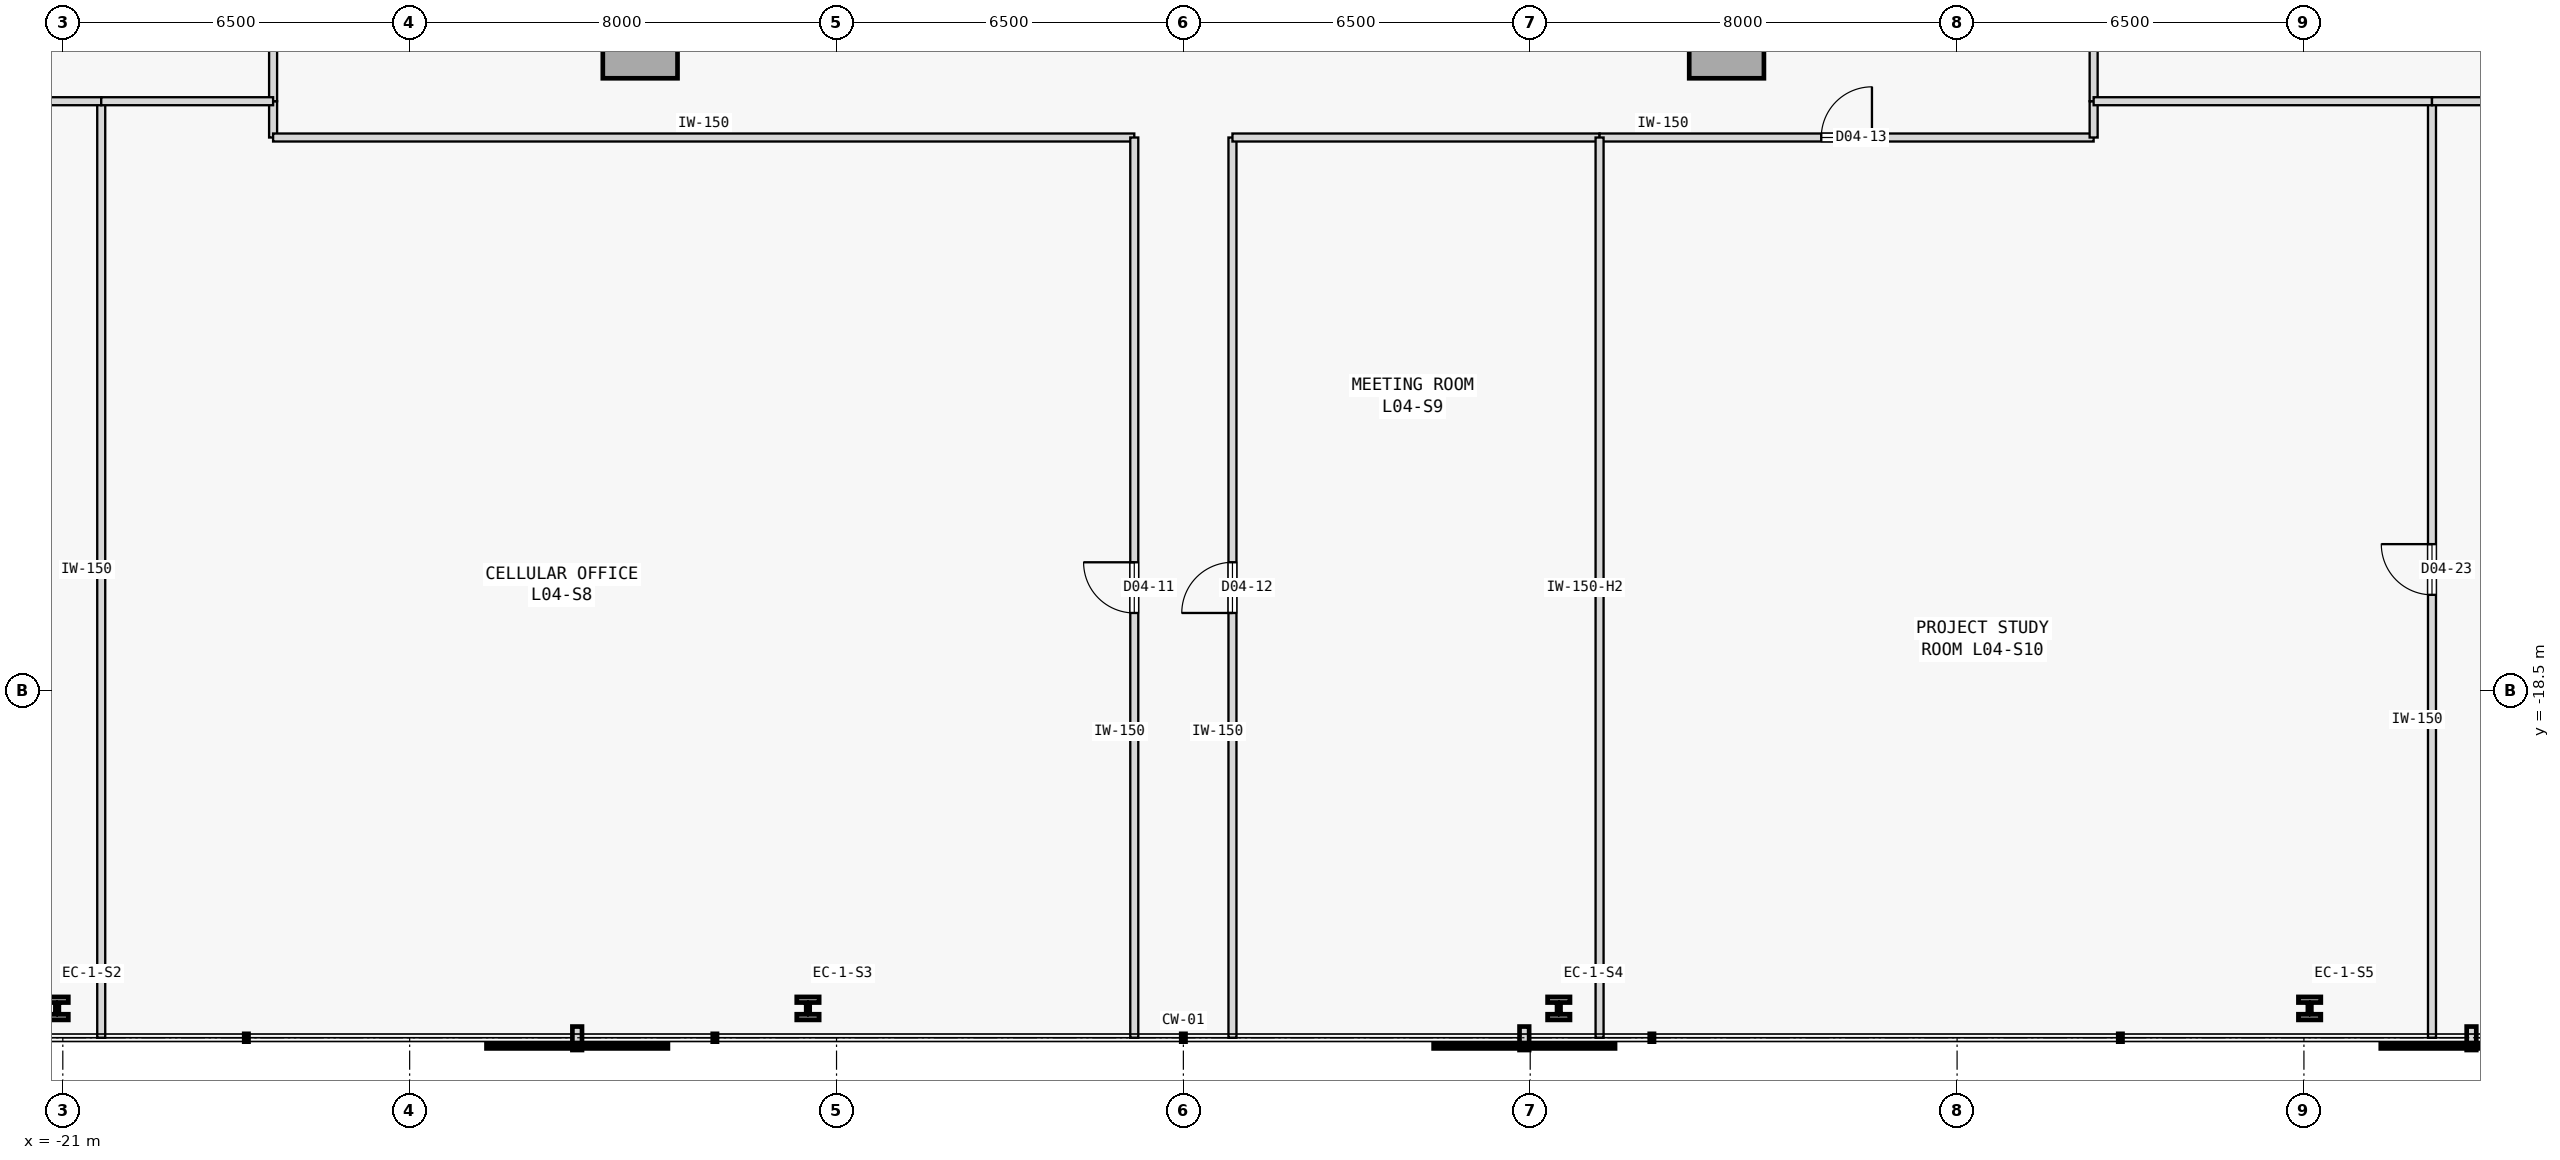
"""IFC4 building model, lengths in metres.
Left out: names, types, materials, properties, quantities, classifications, styles, units other than length and angle.
Written with IfcOpenShell. Run it as: python <this file> out.ifc"""

import sys

from ifc_helpers import new_model, si_unit, direction, frame, frame_2d, origin, origin_2d, place, context, subcontext, project, spatial, rectangle, i_section, extrude, element, fill, save


model = new_model("IFC4")
c1 = context("Model", 3, precision=1e-05, world=origin(), true_north=direction((0.0, 1.0)))
c2 = subcontext(c1, "Body", "Model", "MODEL_VIEW")
j1 = project(units=[si_unit("LENGTHUNIT", "METRE"), si_unit("PLANEANGLEUNIT", "RADIAN")], contexts=[c1])
p1 = place(None, origin())
s1 = spatial("IfcSite", under=j1, at=p1, CompositionType="ELEMENT")
p2 = place(p1, origin())
s2 = spatial("IfcBuilding", under=s1, at=p2, CompositionType="ELEMENT")
p3 = place(p2, frame((0.0, 0.0, 21.8)))
s3 = spatial("IfcBuildingStorey", under=s2, at=p3, CompositionType="ELEMENT", Elevation=21.8)
for number, where, z_axis, x_axis in (
    (1, (-10.18, -6.32, 0.0), (0.0, 0.0, 1.0), (1.0, 0.0, 0.0)),
    (2, (10.18, -6.32, 0.0), (0.0, 0.0, 1.0), (1.0, 0.0, 0.0)),
):
    element("IfcColumn", number, at=place(p3, frame(where, z_axis=z_axis, x_axis=x_axis)), inside=s3, PredefinedType="COLUMN", context=c2, shape_type="SweptSolid", body=[
        extrude(rectangle(XDim=1.4, YDim=1.4, at=origin_2d()), origin(), (0.0, 0.0, 1.0), 3.8),
    ])
for number, where, z_axis, x_axis in (
    (3, (-21.107, -24.45, 0.0), (0.0, 0.0, 1.0), (1.0, 0.0, 0.0)),
    (4, (-7.036, -24.45, 0.0), (0.0, 0.0, 1.0), (1.0, 0.0, 0.0)),
    (5, (7.036, -24.45, 0.0), (0.0, 0.0, 1.0), (1.0, 0.0, 0.0)),
    (6, (21.107, -24.45, 0.0), (0.0, 0.0, 1.0), (1.0, 0.0, 0.0)),
):
    element("IfcColumn", number, at=place(p3, frame(where, z_axis=z_axis, x_axis=x_axis)), inside=s3, PredefinedType="COLUMN", context=c2, shape_type="SweptSolid", body=[
        extrude(i_section(OverallWidth=0.42, OverallDepth=0.431, WebThickness=0.065, FlangeThickness=0.106, FilletRadius=0.015, at=origin_2d()), origin(), (0.0, 0.0, 1.0), 3.8),
    ])
p4 = place(p3, frame((-17.059, -8.13, 0.0), z_axis=(0.0, 0.0, 1.0), x_axis=(0.0, 1.0, 0.0)))
e7 = element("IfcWall", 7, at=p4, inside=s3, PredefinedType="PARTITIONING", context=c2, shape_type="SweptSolid", body=[
    extrude(rectangle(XDim=0.68, YDim=0.15, at=frame_2d((0.34, 0.0))), origin(), (0.0, 0.0, 1.0), 3.575),
])
p5 = place(p3, frame((-17.059, -8.13, 0.0), z_axis=(0.0, 0.0, 1.0), x_axis=(1.0, 0.0, 0.0)))
e8 = element("IfcWall", 8, at=p5, inside=s3, PredefinedType="PARTITIONING", context=c2, shape_type="SweptSolid", body=[
    extrude(rectangle(XDim=16.139, YDim=0.15, at=frame_2d((8.07, 0.0))), origin(), (0.0, 0.0, 1.0), 3.575),
])
p6 = place(p3, frame((-0.92, -25.0, 0.0), z_axis=(0.0, 0.0, 1.0), x_axis=(0.0, 1.0, 0.0)))
e9 = element("IfcWall", 9, at=p6, inside=s3, PredefinedType="PARTITIONING", context=c2, shape_type="SweptSolid", body=[
    extrude(rectangle(XDim=16.87, YDim=0.15, at=frame_2d((8.435, 0.0))), origin(), (0.0, 0.0, 1.0), 3.575),
])
p7 = place(p6, frame((7.96, 0.0, 0.0)))
e10 = element("IfcOpeningElement", 10, at=p7, cuts=e9, PredefinedType="OPENING", context=c2, shape_type="SweptSolid", body=[
    extrude(rectangle(XDim=0.95, YDim=2.15, at=frame_2d((0.475, 1.075))), frame((0.0, 0.085, 0.0), z_axis=(0.0, -1.0, 0.0), x_axis=(1.0, 0.0, 0.0)), (0.0, 0.0, 1.0), 0.17),
])
p8 = place(p3, frame((0.92, -25.0, 0.0), z_axis=(0.0, 0.0, 1.0), x_axis=(0.0, 1.0, 0.0)))
e11 = element("IfcWall", 11, at=p8, inside=s3, PredefinedType="PARTITIONING", context=c2, shape_type="SweptSolid", body=[
    extrude(rectangle(XDim=16.87, YDim=0.15, at=frame_2d((8.435, 0.0))), origin(), (0.0, 0.0, 1.0), 3.575),
])
p9 = place(p8, frame((7.96, 0.0, 0.0)))
e12 = element("IfcOpeningElement", 12, at=p9, cuts=e11, PredefinedType="OPENING", context=c2, shape_type="SweptSolid", body=[
    extrude(rectangle(XDim=0.95, YDim=2.15, at=frame_2d((0.475, 1.075))), frame((0.0, 0.085, 0.0), z_axis=(0.0, -1.0, 0.0), x_axis=(1.0, 0.0, 0.0)), (0.0, 0.0, 1.0), 0.17),
])
p10 = place(p3, frame((0.92, -8.13, 0.0), z_axis=(0.0, 0.0, 1.0), x_axis=(1.0, 0.0, 0.0)))
e13 = element("IfcWall", 13, at=p10, inside=s3, PredefinedType="PARTITIONING", context=c2, shape_type="SweptSolid", body=[
    extrude(rectangle(XDim=6.88, YDim=0.15, at=frame_2d((3.44, 0.0))), origin(), (0.0, 0.0, 1.0), 3.575),
])
p11 = place(p3, frame((7.8, -8.13, 0.0), z_axis=(0.0, 0.0, 1.0), x_axis=(1.0, 0.0, 0.0)))
e14 = element("IfcWall", 14, at=p11, inside=s3, PredefinedType="PARTITIONING", context=c2, shape_type="SweptSolid", body=[
    extrude(rectangle(XDim=9.259, YDim=0.15, at=frame_2d((4.629, 0.0))), origin(), (0.0, 0.0, 1.0), 3.575),
])
p12 = place(p11, frame((4.155, 0.0, 0.0)))
e15 = element("IfcOpeningElement", 15, at=p12, cuts=e14, PredefinedType="OPENING", context=c2, shape_type="SweptSolid", body=[
    extrude(rectangle(XDim=0.95, YDim=2.15, at=frame_2d((0.475, 1.075))), frame((0.0, 0.085, 0.0), z_axis=(0.0, -1.0, 0.0), x_axis=(1.0, 0.0, 0.0)), (0.0, 0.0, 1.0), 0.17),
])
p13 = place(p3, frame((17.059, -8.13, 0.0), z_axis=(0.0, 0.0, 1.0), x_axis=(0.0, 1.0, 0.0)))
e16 = element("IfcWall", 16, at=p13, inside=s3, PredefinedType="PARTITIONING", context=c2, shape_type="SweptSolid", body=[
    extrude(rectangle(XDim=0.68, YDim=0.15, at=frame_2d((0.34, 0.0))), origin(), (0.0, 0.0, 1.0), 3.575),
])
p14 = place(p3, frame((-17.059, -7.45, 0.0), z_axis=(0.0, 0.0, 1.0), x_axis=(0.0, 1.0, 0.0)))
e17 = element("IfcWall", 17, at=p14, inside=s3, PredefinedType="PARTITIONING", context=c2, shape_type="SweptSolid", body=[
    extrude(rectangle(XDim=3.129, YDim=0.15, at=frame_2d((1.564, 0.0))), origin(), (0.0, 0.0, 1.0), 3.575),
])
p15 = place(p14, frame((1.09, 0.0, 0.0)))
e18 = element("IfcOpeningElement", 18, at=p15, cuts=e17, PredefinedType="OPENING", context=c2, shape_type="SweptSolid", body=[
    extrude(rectangle(XDim=0.95, YDim=2.15, at=frame_2d((0.475, 1.075))), frame((0.0, 0.085, 0.0), z_axis=(0.0, -1.0, 0.0), x_axis=(1.0, 0.0, 0.0)), (0.0, 0.0, 1.0), 0.17),
])
p16 = place(p3, frame((17.059, -7.45, 0.0), z_axis=(0.0, 0.0, 1.0), x_axis=(0.0, 1.0, 0.0)))
e19 = element("IfcWall", 19, at=p16, inside=s3, PredefinedType="PARTITIONING", context=c2, shape_type="SweptSolid", body=[
    extrude(rectangle(XDim=6.53, YDim=0.15, at=frame_2d((3.265, 0.0))), origin(), (0.0, 0.0, 1.0), 3.575),
])
p17 = place(p3, frame((-20.28, -25.0, 0.0), z_axis=(0.0, 0.0, 1.0), x_axis=(0.0, 1.0, 0.0)))
e20 = element("IfcWall", 20, at=p17, inside=s3, PredefinedType="PARTITIONING", context=c2, shape_type="SweptSolid", body=[
    extrude(rectangle(XDim=17.55, YDim=0.15, at=frame_2d((8.775, 0.0))), origin(), (0.0, 0.0, 1.0), 3.575),
])
p18 = place(p3, frame((-39.0, -7.45, 0.0), z_axis=(0.0, 0.0, 1.0), x_axis=(1.0, 0.0, 0.0)))
e21 = element("IfcWall", 21, at=p18, inside=s3, PredefinedType="PARTITIONING", context=c2, shape_type="SweptSolid", body=[
    extrude(rectangle(XDim=18.72, YDim=0.15, at=frame_2d((9.36, 0.0))), origin(), (0.0, 0.0, 1.0), 3.575),
])
p19 = place(p18, frame((8.885, 0.0, 0.0)))
e22 = element("IfcOpeningElement", 22, at=p19, cuts=e21, PredefinedType="OPENING", context=c2, shape_type="SweptSolid", body=[
    extrude(rectangle(XDim=0.95, YDim=2.15, at=frame_2d((0.475, 1.075))), frame((0.0, 0.085, 0.0), z_axis=(0.0, -1.0, 0.0), x_axis=(1.0, 0.0, 0.0)), (0.0, 0.0, 1.0), 0.17),
])
p20 = place(p3, frame((-20.28, -7.45, 0.0), z_axis=(0.0, 0.0, 1.0), x_axis=(1.0, 0.0, 0.0)))
e23 = element("IfcWall", 23, at=p20, inside=s3, PredefinedType="PARTITIONING", context=c2, shape_type="SweptSolid", body=[
    extrude(rectangle(XDim=3.221, YDim=0.15, at=frame_2d((1.61, 0.0))), origin(), (0.0, 0.0, 1.0), 3.575),
])
p21 = place(p3, frame((7.8, -25.0, 0.0), z_axis=(0.0, 0.0, 1.0), x_axis=(0.0, 1.0, 0.0)))
e24 = element("IfcWall", 24, at=p21, inside=s3, PredefinedType="PARTITIONING", context=c2, shape_type="SweptSolid", body=[
    extrude(rectangle(XDim=16.87, YDim=0.15, at=frame_2d((8.435, 0.0))), origin(), (0.0, 0.0, 1.0), 2.975),
])
p22 = place(p3, frame((23.4, -25.0, 0.0), z_axis=(0.0, 0.0, 1.0), x_axis=(0.0, 1.0, 0.0)))
e25 = element("IfcWall", 25, at=p22, inside=s3, PredefinedType="PARTITIONING", context=c2, shape_type="SweptSolid", body=[
    extrude(rectangle(XDim=17.55, YDim=0.15, at=frame_2d((8.775, 0.0))), origin(), (0.0, 0.0, 1.0), 3.575),
])
p23 = place(p22, frame((8.3, 0.0, 0.0)))
e26 = element("IfcOpeningElement", 26, at=p23, cuts=e25, PredefinedType="OPENING", context=c2, shape_type="SweptSolid", body=[
    extrude(rectangle(XDim=0.95, YDim=2.15, at=frame_2d((0.475, 1.075))), frame((0.0, 0.085, 0.0), z_axis=(0.0, -1.0, 0.0), x_axis=(1.0, 0.0, 0.0)), (0.0, 0.0, 1.0), 0.17),
])
p24 = place(p3, frame((17.059, -7.45, 0.0), z_axis=(0.0, 0.0, 1.0), x_axis=(1.0, 0.0, 0.0)))
e27 = element("IfcWall", 27, at=p24, inside=s3, PredefinedType="PARTITIONING", context=c2, shape_type="SweptSolid", body=[
    extrude(rectangle(XDim=6.341, YDim=0.15, at=frame_2d((3.17, 0.0))), origin(), (0.0, 0.0, 1.0), 3.575),
])
p25 = place(p3, frame((23.4, -7.45, 0.0), z_axis=(0.0, 0.0, 1.0), x_axis=(1.0, 0.0, 0.0)))
e28 = element("IfcWall", 28, at=p25, inside=s3, PredefinedType="PARTITIONING", context=c2, shape_type="SweptSolid", body=[
    extrude(rectangle(XDim=15.6, YDim=0.15, at=frame_2d((7.8, 0.0))), origin(), (0.0, 0.0, 1.0), 3.575),
])
p26 = place(p7, origin())
e29 = element("IfcDoor", 29, at=p26, inside=s3, OperationType="SINGLE_SWING_RIGHT", PredefinedType="DOOR", context=c2, shape_type="SweptSolid", body=[
    extrude(rectangle(XDim=0.95, YDim=2.15, at=frame_2d((0.475, 1.075))), frame((0.0, 0.025, 0.0), z_axis=(0.0, -1.0, 0.0), x_axis=(1.0, 0.0, 0.0)), (0.0, 0.0, 1.0), 0.05),
])
fill(e10, e29)
p27 = place(p9, origin())
e30 = element("IfcDoor", 30, at=p27, inside=s3, OperationType="SINGLE_SWING_LEFT", PredefinedType="DOOR", context=c2, shape_type="SweptSolid", body=[
    extrude(rectangle(XDim=0.95, YDim=2.15, at=frame_2d((0.475, 1.075))), frame((0.0, 0.025, 0.0), z_axis=(0.0, -1.0, 0.0), x_axis=(1.0, 0.0, 0.0)), (0.0, 0.0, 1.0), 0.05),
])
fill(e12, e30)
p28 = place(p12, origin())
e31 = element("IfcDoor", 31, at=p28, inside=s3, OperationType="SINGLE_SWING_RIGHT", PredefinedType="DOOR", context=c2, shape_type="SweptSolid", body=[
    extrude(rectangle(XDim=0.95, YDim=2.15, at=frame_2d((0.475, 1.075))), frame((0.0, 0.025, 0.0), z_axis=(0.0, -1.0, 0.0), x_axis=(1.0, 0.0, 0.0)), (0.0, 0.0, 1.0), 0.05),
])
fill(e15, e31)
p29 = place(p23, origin())
e32 = element("IfcDoor", 32, at=p29, inside=s3, OperationType="SINGLE_SWING_RIGHT", PredefinedType="DOOR", context=c2, shape_type="SweptSolid", body=[
    extrude(rectangle(XDim=0.95, YDim=2.15, at=frame_2d((0.475, 1.075))), frame((0.0, 0.025, 0.0), z_axis=(0.0, -1.0, 0.0), x_axis=(1.0, 0.0, 0.0)), (0.0, 0.0, 1.0), 0.05),
])
fill(e26, e32)
save(model, sys.argv[1])
